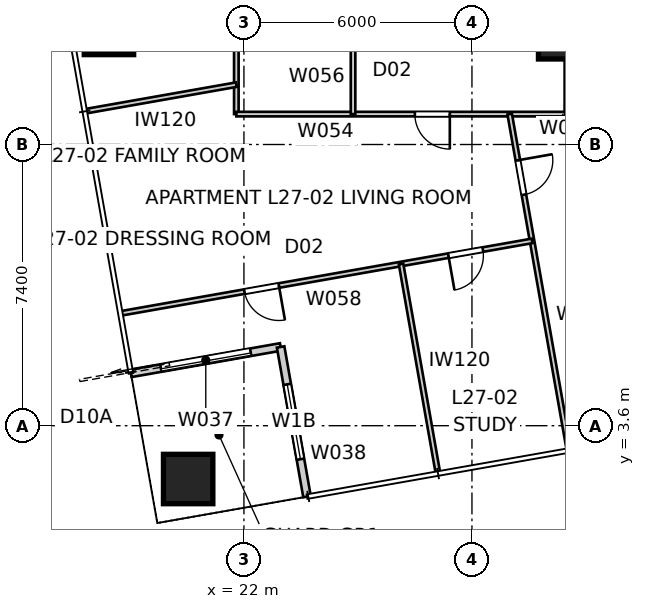
"""IFC4 building model, lengths in metres.
Left out: names, types, materials, properties, quantities, classifications, styles, units other than length and angle.
Written with IfcOpenShell. Run it as: python <this file> out.ifc"""

import sys

from ifc_helpers import new_model, si_unit, direction, frame, frame_2d, origin, origin_2d, place, context, subcontext, project, spatial, rectangle, extrude, element, fill, save


model = new_model("IFC4")
c1 = context("Model", 3, precision=1e-05, world=origin(), true_north=direction((0.0, 1.0)))
c2 = subcontext(c1, "Body", "Model", "MODEL_VIEW")
j1 = project(units=[si_unit("LENGTHUNIT", "METRE"), si_unit("PLANEANGLEUNIT", "RADIAN")], contexts=[c1])
p1 = place(None, origin())
s1 = spatial("IfcSite", under=j1, at=p1, CompositionType="ELEMENT")
p2 = place(p1, origin())
s2 = spatial("IfcBuilding", under=s1, at=p2, CompositionType="ELEMENT")
p3 = place(p2, frame((0.0, 0.0, 99.8)))
s3 = spatial("IfcBuildingStorey", under=s2, at=p3, CompositionType="ELEMENT", Elevation=99.8)
for number, where, z_axis, x_axis in (
    (1, (20.532, 2.197, 0.0), (0.0, 0.0, 1.0), (1.0, 0.0, 0.0)),
    (2, (18.448, 14.015, 0.0), (0.0, 0.0, 1.0), (1.0, 0.0, 0.0)),
):
    element("IfcColumn", number, at=place(p3, frame(where, z_axis=z_axis, x_axis=x_axis)), inside=s3, PredefinedType="COLUMN", context=c2, shape_type="SweptSolid", body=[
        extrude(rectangle(XDim=1.3, YDim=1.3, at=origin_2d()), origin(), (0.0, 0.0, 1.0), 3.4),
    ])
p4 = place(p3, frame((30.5, 14.0, 0.0), z_axis=(0.0, 0.0, 1.0), x_axis=(1.0, 0.0, 0.0)))
e3 = element("IfcColumn", 3, at=p4, inside=s3, PredefinedType="COLUMN", context=c2, shape_type="SweptSolid", body=[
    extrude(rectangle(XDim=1.5, YDim=1.5, at=origin_2d()), origin(), (0.0, 0.0, 1.0), 3.4),
])
p5 = place(p3, frame((19.026, 4.978, 0.0), z_axis=(0.0, 0.0, 1.0), x_axis=(0.984808127031, 0.173646056486, 0.0)))
e4 = element("IfcWall", 4, at=p5, inside=s3, PredefinedType="SOLIDWALL", context=c2, shape_type="SweptSolid", body=[
    extrude(rectangle(XDim=4.0, YDim=0.2, at=frame_2d((2.0, 0.0))), origin(), (0.0, 0.0, 1.0), 3.25),
])
p6 = place(p5, frame((0.8, 0.0, 0.0)))
e5 = element("IfcOpeningElement", 5, at=p6, cuts=e4, PredefinedType="OPENING", context=c2, shape_type="SweptSolid", body=[
    extrude(rectangle(XDim=2.4, YDim=2.1, at=frame_2d((1.2, 1.05))), frame((0.0, 0.11, 0.0), z_axis=(0.0, -1.0, 0.0), x_axis=(1.0, 0.0, 0.0)), (0.0, 0.0, 1.0), 0.22),
])
p7 = place(p3, frame((22.966, 5.672, 0.0), z_axis=(0.0, 0.0, 1.0), x_axis=(0.173646056486, -0.984808127031, 0.0)))
e6 = element("IfcWall", 6, at=p7, inside=s3, PredefinedType="SOLIDWALL", context=c2, shape_type="SweptSolid", body=[
    extrude(rectangle(XDim=4.0, YDim=0.2, at=frame_2d((2.0, 0.0))), origin(), (0.0, 0.0, 1.0), 3.25),
])
p8 = place(p7, frame((1.0, 0.0, 0.45)))
e7 = element("IfcOpeningElement", 7, at=p8, cuts=e6, PredefinedType="OPENING", context=c2, shape_type="SweptSolid", body=[
    extrude(rectangle(XDim=2.0, YDim=1.8, at=frame_2d((1.0, 0.9))), frame((0.0, 0.11, 0.0), z_axis=(0.0, -1.0, 0.0), x_axis=(1.0, 0.0, 0.0)), (0.0, 0.0, 1.0), 0.22),
])
p9 = place(p3, frame((21.8, 11.8, 0.0), z_axis=(0.0, 0.0, 1.0), x_axis=(0.0, 1.0, 0.0)))
e8 = element("IfcWall", 8, at=p9, inside=s3, PredefinedType="PARTITIONING", context=c2, shape_type="SweptSolid", body=[
    extrude(rectangle(XDim=25.653, YDim=0.12, at=frame_2d((12.826, 0.0))), origin(), (0.0, 0.0, 1.0), 3.25),
])
p10 = place(p9, frame((16.333, 0.0, 0.0)))
e9 = element("IfcOpeningElement", 9, at=p10, cuts=e8, PredefinedType="OPENING", context=c2, shape_type="SweptSolid", body=[
    extrude(rectangle(XDim=0.92, YDim=2.34, at=frame_2d((0.46, 1.17))), frame((0.0, 0.07, 0.0), z_axis=(0.0, -1.0, 0.0), x_axis=(1.0, 0.0, 0.0)), (0.0, 0.0, 1.0), 0.14),
])
p11 = place(p9, frame((18.821, 0.0, 0.0)))
e10 = element("IfcOpeningElement", 10, at=p11, cuts=e8, PredefinedType="OPENING", context=c2, shape_type="SweptSolid", body=[
    extrude(rectangle(XDim=0.92, YDim=2.34, at=frame_2d((0.46, 1.17))), frame((0.0, 0.07, 0.0), z_axis=(0.0, -1.0, 0.0), x_axis=(1.0, 0.0, 0.0)), (0.0, 0.0, 1.0), 0.14),
])
p12 = place(p9, frame((12.401, 0.0, 0.0)))
e11 = element("IfcOpeningElement", 11, at=p12, cuts=e8, PredefinedType="OPENING", context=c2, shape_type="SweptSolid", body=[
    extrude(rectangle(XDim=0.92, YDim=2.34, at=frame_2d((0.46, 1.17))), frame((0.0, 0.07, 0.0), z_axis=(0.0, -1.0, 0.0), x_axis=(1.0, 0.0, 0.0)), (0.0, 0.0, 1.0), 0.14),
])
p13 = place(p9, frame((2.066, 0.0, 0.0)))
e12 = element("IfcOpeningElement", 12, at=p13, cuts=e8, PredefinedType="OPENING", context=c2, shape_type="SweptSolid", body=[
    extrude(rectangle(XDim=0.92, YDim=2.34, at=frame_2d((0.46, 1.17))), frame((0.0, 0.07, 0.0), z_axis=(0.0, -1.0, 0.0), x_axis=(1.0, 0.0, 0.0)), (0.0, 0.0, 1.0), 0.14),
])
p14 = place(p9, frame((23.651, 0.0, 0.0)))
e13 = element("IfcOpeningElement", 13, at=p14, cuts=e8, PredefinedType="OPENING", context=c2, shape_type="SweptSolid", body=[
    extrude(rectangle(XDim=0.96, YDim=2.1, at=frame_2d((0.48, 1.05))), frame((0.0, 0.07, 0.0), z_axis=(0.0, -1.0, 0.0), x_axis=(1.0, 0.0, 0.0)), (0.0, 0.0, 1.0), 0.14),
])
p15 = place(p3, frame((30.5, 11.8, 0.0), z_axis=(0.0, 0.0, 1.0), x_axis=(0.0, 1.0, 0.0)))
e14 = element("IfcWall", 14, at=p15, inside=s3, PredefinedType="PARTITIONING", context=c2, shape_type="SweptSolid", body=[
    extrude(rectangle(XDim=3.6, YDim=0.12, at=frame_2d((1.8, 0.0))), origin(), (0.0, 0.0, 1.0), 3.25),
])
p16 = place(p15, frame((0.42, 0.0, 0.0)))
e15 = element("IfcOpeningElement", 15, at=p16, cuts=e14, PredefinedType="OPENING", context=c2, shape_type="SweptSolid", body=[
    extrude(rectangle(XDim=0.96, YDim=2.1, at=frame_2d((0.48, 1.05))), frame((0.0, 0.07, 0.0), z_axis=(0.0, -1.0, 0.0), x_axis=(1.0, 0.0, 0.0)), (0.0, 0.0, 1.0), 0.14),
])
p17 = place(p3, frame((31.975, 11.8, 0.0), z_axis=(0.0, 0.0, 1.0), x_axis=(-1.0, 0.0, 0.0)))
e16 = element("IfcWall", 16, at=p17, inside=s3, PredefinedType="PARTITIONING", context=c2, shape_type="SweptSolid", body=[
    extrude(rectangle(XDim=10.175, YDim=0.12, at=frame_2d((5.088, 0.0))), origin(), (0.0, 0.0, 1.0), 3.25),
])
p18 = place(p17, frame((4.558, 0.0, 0.0)))
e17 = element("IfcOpeningElement", 17, at=p18, cuts=e16, PredefinedType="OPENING", context=c2, shape_type="SweptSolid", body=[
    extrude(rectangle(XDim=0.92, YDim=2.34, at=frame_2d((0.46, 1.17))), frame((0.0, 0.07, 0.0), z_axis=(0.0, -1.0, 0.0), x_axis=(1.0, 0.0, 0.0)), (0.0, 0.0, 1.0), 0.14),
])
p19 = place(p3, frame((24.871, 11.8, 0.0), z_axis=(0.0, 0.0, 1.0), x_axis=(0.0, 1.0, 0.0)))
e18 = element("IfcWall", 18, at=p19, inside=s3, PredefinedType="PARTITIONING", context=c2, shape_type="SweptSolid", body=[
    extrude(rectangle(XDim=4.87, YDim=0.12, at=frame_2d((2.435, 0.0))), origin(), (0.0, 0.0, 1.0), 3.25),
])
p20 = place(p19, frame((1.975, 0.0, 0.0)))
e19 = element("IfcOpeningElement", 19, at=p20, cuts=e18, PredefinedType="OPENING", context=c2, shape_type="SweptSolid", body=[
    extrude(rectangle(XDim=0.92, YDim=2.34, at=frame_2d((0.46, 1.17))), frame((0.0, 0.07, 0.0), z_axis=(0.0, -1.0, 0.0), x_axis=(1.0, 0.0, 0.0)), (0.0, 0.0, 1.0), 0.14),
])
p21 = place(p3, frame((28.993, 11.8, 0.0), z_axis=(0.0, 0.0, 1.0), x_axis=(0.173639020759, -0.984809367578, 0.0)))
e20 = element("IfcWall", 20, at=p21, inside=s3, PredefinedType="PARTITIONING", context=c2, shape_type="SweptSolid", body=[
    extrude(rectangle(XDim=8.948, YDim=0.12, at=frame_2d((4.474, 0.0))), origin(), (0.0, 0.0, 1.0), 2.638),
])
p22 = place(p21, frame((1.234, 0.0, 0.0)))
e21 = element("IfcOpeningElement", 21, at=p22, cuts=e20, PredefinedType="OPENING", context=c2, shape_type="SweptSolid", body=[
    extrude(rectangle(XDim=0.92, YDim=2.34, at=frame_2d((0.46, 1.17))), frame((0.0, 0.07, 0.0), z_axis=(0.0, -1.0, 0.0), x_axis=(1.0, 0.0, 0.0)), (0.0, 0.0, 1.0), 0.14),
])
p23 = place(p3, frame((29.582, 8.463, 0.0), z_axis=(0.0, 0.0, 1.0), x_axis=(-0.98480552757, -0.173660798302, 0.0)))
e22 = element("IfcWall", 22, at=p23, inside=s3, PredefinedType="PARTITIONING", context=c2, shape_type="SweptSolid", body=[
    extrude(rectangle(XDim=10.96, YDim=0.12, at=frame_2d((5.48, 0.0))), origin(), (0.0, 0.0, 1.0), 3.25),
])
p24 = place(p23, frame((6.765, 0.0, 0.0)))
e23 = element("IfcOpeningElement", 23, at=p24, cuts=e22, PredefinedType="OPENING", context=c2, shape_type="SweptSolid", body=[
    extrude(rectangle(XDim=0.92, YDim=2.34, at=frame_2d((0.46, 1.17))), frame((0.0, 0.07, 0.0), z_axis=(0.0, -1.0, 0.0), x_axis=(1.0, 0.0, 0.0)), (0.0, 0.0, 1.0), 0.14),
])
p25 = place(p23, frame((1.315, 0.0, 0.0)))
e24 = element("IfcOpeningElement", 24, at=p25, cuts=e22, PredefinedType="OPENING", context=c2, shape_type="SweptSolid", body=[
    extrude(rectangle(XDim=0.92, YDim=2.34, at=frame_2d((0.46, 1.17))), frame((0.0, 0.07, 0.0), z_axis=(0.0, -1.0, 0.0), x_axis=(1.0, 0.0, 0.0)), (0.0, 0.0, 1.0), 0.14),
])
p26 = place(p3, frame((17.85, 11.878, 0.0), z_axis=(0.0, 0.0, 1.0), x_axis=(0.984803775068, 0.173670736201, 0.0)))
e25 = element("IfcWall", 25, at=p26, inside=s3, PredefinedType="PARTITIONING", context=c2, shape_type="SweptSolid", body=[
    extrude(rectangle(XDim=4.011, YDim=0.12, at=frame_2d((2.005, 0.0))), origin(), (0.0, 0.0, 1.0), 2.638),
])
p27 = place(p3, frame((26.135, 7.855, 0.0), z_axis=(0.0, 0.0, 1.0), x_axis=(0.173635023028, -0.984810072439, 0.0)))
e26 = element("IfcWall", 26, at=p27, inside=s3, PredefinedType="PARTITIONING", context=c2, shape_type="SweptSolid", body=[
    extrude(rectangle(XDim=5.56, YDim=0.12, at=frame_2d((2.78, 0.0))), origin(), (0.0, 0.0, 1.0), 3.25),
])
p28 = place(p6, origin())
e27 = element("IfcDoor", 27, at=p28, inside=s3, OperationType="SLIDING_TO_LEFT", PredefinedType="DOOR", context=c2, shape_type="SweptSolid", body=[
    extrude(rectangle(XDim=2.4, YDim=2.1, at=frame_2d((1.2, 1.05))), frame((0.0, 0.025, 0.0), z_axis=(0.0, -1.0, 0.0), x_axis=(1.0, 0.0, 0.0)), (0.0, 0.0, 1.0), 0.05),
])
fill(e5, e27)
p29 = place(p8, origin())
e28 = element("IfcWindow", 28, at=p29, inside=s3, PartitioningType="SINGLE_PANEL", PredefinedType="WINDOW", context=c2, shape_type="SweptSolid", body=[
    extrude(rectangle(XDim=2.0, YDim=1.8, at=frame_2d((1.0, 0.9))), frame((0.0, 0.03, 0.0), z_axis=(0.0, -1.0, 0.0), x_axis=(1.0, 0.0, 0.0)), (0.0, 0.0, 1.0), 0.06),
])
fill(e7, e28)
p30 = place(p18, origin())
e29 = element("IfcDoor", 29, at=p30, inside=s3, OperationType="SINGLE_SWING_LEFT", PredefinedType="DOOR", context=c2, shape_type="SweptSolid", body=[
    extrude(rectangle(XDim=0.92, YDim=2.34, at=frame_2d((0.46, 1.17))), frame((0.0, 0.025, 0.0), z_axis=(0.0, -1.0, 0.0), x_axis=(1.0, 0.0, 0.0)), (0.0, 0.0, 1.0), 0.05),
])
fill(e17, e29)
p31 = place(p24, origin())
e30 = element("IfcDoor", 30, at=p31, inside=s3, OperationType="SINGLE_SWING_LEFT", PredefinedType="DOOR", context=c2, shape_type="SweptSolid", body=[
    extrude(rectangle(XDim=0.92, YDim=2.34, at=frame_2d((0.46, 1.17))), frame((0.0, 0.025, 0.0), z_axis=(0.0, -1.0, 0.0), x_axis=(1.0, 0.0, 0.0)), (0.0, 0.0, 1.0), 0.05),
])
fill(e23, e30)
p32 = place(p25, origin())
e31 = element("IfcDoor", 31, at=p32, inside=s3, OperationType="SINGLE_SWING_RIGHT", PredefinedType="DOOR", context=c2, shape_type="SweptSolid", body=[
    extrude(rectangle(XDim=0.92, YDim=2.34, at=frame_2d((0.46, 1.17))), frame((0.0, 0.025, 0.0), z_axis=(0.0, -1.0, 0.0), x_axis=(1.0, 0.0, 0.0)), (0.0, 0.0, 1.0), 0.05),
])
fill(e24, e31)
p33 = place(p22, origin())
e32 = element("IfcDoor", 32, at=p33, inside=s3, OperationType="SINGLE_SWING_LEFT", PredefinedType="DOOR", context=c2, shape_type="SweptSolid", body=[
    extrude(rectangle(XDim=0.92, YDim=2.34, at=frame_2d((0.46, 1.17))), frame((0.0, 0.025, 0.0), z_axis=(0.0, -1.0, 0.0), x_axis=(1.0, 0.0, 0.0)), (0.0, 0.0, 1.0), 0.05),
])
fill(e21, e32)
save(model, sys.argv[1])
